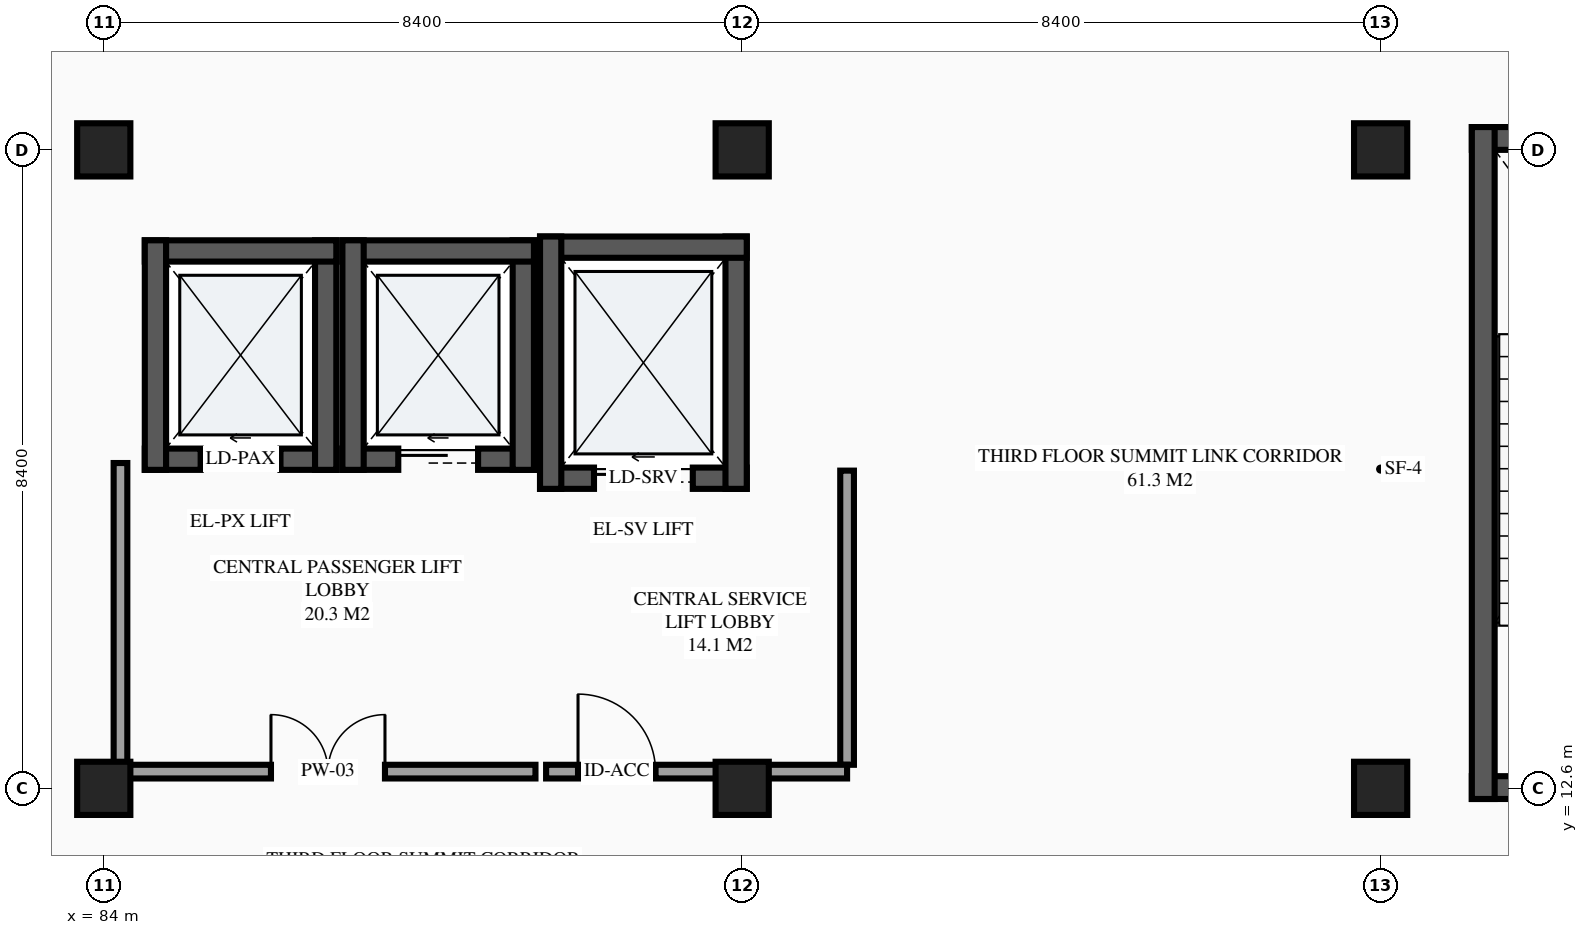
"""IFC4 building model, lengths in metres.
Left out: names, types, materials, properties, quantities, classifications, styles, units other than length and angle.
Written with IfcOpenShell. Run it as: python <this file> out.ifc"""

import sys

from ifc_helpers import new_model, si_unit, direction, frame, frame_2d, origin, origin_2d, place, context, subcontext, project, spatial, rectangle, extrude, element, fill, save


model = new_model("IFC4")
c1 = context("Model", 3, precision=1e-05, world=origin(), true_north=direction((0.0, 1.0)))
c2 = subcontext(c1, "Body", "Model", "MODEL_VIEW")
j1 = project(units=[si_unit("LENGTHUNIT", "METRE"), si_unit("PLANEANGLEUNIT", "RADIAN")], contexts=[c1])
p1 = place(None, origin())
s1 = spatial("IfcSite", under=j1, at=p1, CompositionType="ELEMENT")
p2 = place(p1, origin())
s2 = spatial("IfcBuilding", under=s1, at=p2, CompositionType="ELEMENT")
p3 = place(p2, frame((0.0, 0.0, 14.1)))
s3 = spatial("IfcBuildingStorey", under=s2, at=p3, CompositionType="ELEMENT", Elevation=14.1)
for number, where, z_axis, x_axis in (
    (1, (84.0, 12.6, 0.0), (0.0, 0.0, 1.0), (1.0, 0.0, 0.0)),
    (2, (84.0, 21.0, 0.0), (0.0, 0.0, 1.0), (1.0, 0.0, 0.0)),
    (3, (92.4, 12.6, 0.0), (0.0, 0.0, 1.0), (1.0, 0.0, 0.0)),
    (4, (92.4, 21.0, 0.0), (0.0, 0.0, 1.0), (1.0, 0.0, 0.0)),
    (5, (100.8, 12.6, 0.0), (0.0, 0.0, 1.0), (1.0, 0.0, 0.0)),
    (6, (100.8, 21.0, 0.0), (0.0, 0.0, 1.0), (1.0, 0.0, 0.0)),
):
    element("IfcColumn", number, at=place(p3, frame(where, z_axis=z_axis, x_axis=x_axis)), inside=s3, PredefinedType="COLUMN", context=c2, shape_type="SweptSolid", body=[
        extrude(rectangle(XDim=0.7, YDim=0.7, at=origin_2d()), origin(), (0.0, 0.0, 1.0), 4.2),
    ])
p4 = place(p3, frame((84.54, 16.93, 0.0), z_axis=(0.0, 0.0, 1.0), x_axis=(1.0, 0.0, 0.0)))
e7 = element("IfcWall", 7, at=p4, inside=s3, PredefinedType="SHEAR", context=c2, shape_type="SweptSolid", body=[
    extrude(rectangle(XDim=2.52, YDim=0.28, at=frame_2d((1.26, 0.0))), origin(), (0.0, 0.0, 1.0), 4.2),
])
p5 = place(p4, frame((0.735, 0.0, 0.0)))
e8 = element("IfcOpeningElement", 8, at=p5, cuts=e7, PredefinedType="OPENING", context=c2, shape_type="SweptSolid", body=[
    extrude(rectangle(XDim=1.05, YDim=2.2, at=frame_2d((0.525, 1.1))), frame((0.0, 0.15, 0.0), z_axis=(0.0, -1.0, 0.0), x_axis=(1.0, 0.0, 0.0)), (0.0, 0.0, 1.0), 0.3),
])
p6 = place(p3, frame((86.92, 16.79, 0.0), z_axis=(0.0, 0.0, 1.0), x_axis=(0.0, 1.0, 0.0)))
e9 = element("IfcWall", 9, at=p6, inside=s3, PredefinedType="SHEAR", context=c2, shape_type="SweptSolid", body=[
    extrude(rectangle(XDim=3.02, YDim=0.28, at=frame_2d((1.51, 0.0))), origin(), (0.0, 0.0, 1.0), 4.2),
])
p7 = place(p3, frame((87.06, 19.67, 0.0), z_axis=(0.0, 0.0, 1.0), x_axis=(-1.0, 0.0, 0.0)))
e10 = element("IfcWall", 10, at=p7, inside=s3, PredefinedType="SHEAR", context=c2, shape_type="SweptSolid", body=[
    extrude(rectangle(XDim=2.52, YDim=0.28, at=frame_2d((1.26, 0.0))), origin(), (0.0, 0.0, 1.0), 4.2),
])
p8 = place(p3, frame((84.68, 19.81, 0.0), z_axis=(0.0, 0.0, 1.0), x_axis=(0.0, -1.0, 0.0)))
e11 = element("IfcWall", 11, at=p8, inside=s3, PredefinedType="SHEAR", context=c2, shape_type="SweptSolid", body=[
    extrude(rectangle(XDim=3.02, YDim=0.28, at=frame_2d((1.51, 0.0))), origin(), (0.0, 0.0, 1.0), 4.2),
])
p9 = place(p3, frame((87.14, 16.93, 0.0), z_axis=(0.0, 0.0, 1.0), x_axis=(1.0, 0.0, 0.0)))
e12 = element("IfcWall", 12, at=p9, inside=s3, PredefinedType="SHEAR", context=c2, shape_type="SweptSolid", body=[
    extrude(rectangle(XDim=2.52, YDim=0.28, at=frame_2d((1.26, 0.0))), origin(), (0.0, 0.0, 1.0), 4.2),
])
p10 = place(p9, frame((0.735, 0.0, 0.0)))
e13 = element("IfcOpeningElement", 13, at=p10, cuts=e12, PredefinedType="OPENING", context=c2, shape_type="SweptSolid", body=[
    extrude(rectangle(XDim=1.05, YDim=2.2, at=frame_2d((0.525, 1.1))), frame((0.0, 0.15, 0.0), z_axis=(0.0, -1.0, 0.0), x_axis=(1.0, 0.0, 0.0)), (0.0, 0.0, 1.0), 0.3),
])
p11 = place(p3, frame((89.52, 16.79, 0.0), z_axis=(0.0, 0.0, 1.0), x_axis=(0.0, 1.0, 0.0)))
e14 = element("IfcWall", 14, at=p11, inside=s3, PredefinedType="SHEAR", context=c2, shape_type="SweptSolid", body=[
    extrude(rectangle(XDim=3.02, YDim=0.28, at=frame_2d((1.51, 0.0))), origin(), (0.0, 0.0, 1.0), 4.2),
])
p12 = place(p3, frame((89.66, 19.67, 0.0), z_axis=(0.0, 0.0, 1.0), x_axis=(-1.0, 0.0, 0.0)))
e15 = element("IfcWall", 15, at=p12, inside=s3, PredefinedType="SHEAR", context=c2, shape_type="SweptSolid", body=[
    extrude(rectangle(XDim=2.52, YDim=0.28, at=frame_2d((1.26, 0.0))), origin(), (0.0, 0.0, 1.0), 4.2),
])
p13 = place(p3, frame((87.28, 19.81, 0.0), z_axis=(0.0, 0.0, 1.0), x_axis=(0.0, -1.0, 0.0)))
e16 = element("IfcWall", 16, at=p13, inside=s3, PredefinedType="SHEAR", context=c2, shape_type="SweptSolid", body=[
    extrude(rectangle(XDim=3.02, YDim=0.28, at=frame_2d((1.51, 0.0))), origin(), (0.0, 0.0, 1.0), 4.2),
])
p14 = place(p3, frame((89.74, 16.68, 0.0), z_axis=(0.0, 0.0, 1.0), x_axis=(1.0, 0.0, 0.0)))
e17 = element("IfcWall", 17, at=p14, inside=s3, PredefinedType="SHEAR", context=c2, shape_type="SweptSolid", body=[
    extrude(rectangle(XDim=2.72, YDim=0.28, at=frame_2d((1.36, 0.0))), origin(), (0.0, 0.0, 1.0), 4.2),
])
p15 = place(p14, frame((0.71, 0.0, 0.0)))
e18 = element("IfcOpeningElement", 18, at=p15, cuts=e17, PredefinedType="OPENING", context=c2, shape_type="SweptSolid", body=[
    extrude(rectangle(XDim=1.3, YDim=2.25, at=frame_2d((0.65, 1.125))), frame((0.0, 0.15, 0.0), z_axis=(0.0, -1.0, 0.0), x_axis=(1.0, 0.0, 0.0)), (0.0, 0.0, 1.0), 0.3),
])
p16 = place(p3, frame((92.32, 16.54, 0.0), z_axis=(0.0, 0.0, 1.0), x_axis=(0.0, 1.0, 0.0)))
e19 = element("IfcWall", 19, at=p16, inside=s3, PredefinedType="SHEAR", context=c2, shape_type="SweptSolid", body=[
    extrude(rectangle(XDim=3.32, YDim=0.28, at=frame_2d((1.66, 0.0))), origin(), (0.0, 0.0, 1.0), 4.2),
])
p17 = place(p3, frame((92.46, 19.72, 0.0), z_axis=(0.0, 0.0, 1.0), x_axis=(-1.0, 0.0, 0.0)))
e20 = element("IfcWall", 20, at=p17, inside=s3, PredefinedType="SHEAR", context=c2, shape_type="SweptSolid", body=[
    extrude(rectangle(XDim=2.72, YDim=0.28, at=frame_2d((1.36, 0.0))), origin(), (0.0, 0.0, 1.0), 4.2),
])
p18 = place(p3, frame((89.88, 19.86, 0.0), z_axis=(0.0, 0.0, 1.0), x_axis=(0.0, -1.0, 0.0)))
e21 = element("IfcWall", 21, at=p18, inside=s3, PredefinedType="SHEAR", context=c2, shape_type="SweptSolid", body=[
    extrude(rectangle(XDim=3.32, YDim=0.28, at=frame_2d((1.66, 0.0))), origin(), (0.0, 0.0, 1.0), 4.2),
])
p19 = place(p3, frame((102.0, 12.61, 0.0), z_axis=(0.0, 0.0, 1.0), x_axis=(1.0, 0.0, 0.0)))
e22 = element("IfcWall", 22, at=p19, inside=s3, PredefinedType="SHEAR", context=c2, shape_type="SweptSolid", body=[
    extrude(rectangle(XDim=5.2, YDim=0.3, at=frame_2d((2.6, 0.0))), origin(), (0.0, 0.0, 1.0), 4.2),
])
p20 = place(p19, frame((2.025, 0.0, 0.0)))
e23 = element("IfcOpeningElement", 23, at=p20, cuts=e22, PredefinedType="OPENING", context=c2, shape_type="SweptSolid", body=[
    extrude(rectangle(XDim=1.15, YDim=2.15, at=frame_2d((0.575, 1.075))), frame((0.0, 0.16, 0.0), z_axis=(0.0, -1.0, 0.0), x_axis=(1.0, 0.0, 0.0)), (0.0, 0.0, 1.0), 0.32),
])
p21 = place(p3, frame((107.2, 21.15, 0.0), z_axis=(0.0, 0.0, 1.0), x_axis=(-1.0, 0.0, 0.0)))
e24 = element("IfcWall", 24, at=p21, inside=s3, PredefinedType="SHEAR", context=c2, shape_type="SweptSolid", body=[
    extrude(rectangle(XDim=5.2, YDim=0.3, at=frame_2d((2.6, 0.0))), origin(), (0.0, 0.0, 1.0), 4.2),
])
p22 = place(p3, frame((102.15, 21.3, 0.0), z_axis=(0.0, 0.0, 1.0), x_axis=(0.0, -1.0, 0.0)))
e25 = element("IfcWall", 25, at=p22, inside=s3, PredefinedType="SHEAR", context=c2, shape_type="SweptSolid", body=[
    extrude(rectangle(XDim=8.84, YDim=0.3, at=frame_2d((4.42, 0.0))), origin(), (0.0, 0.0, 1.0), 4.2),
])
p23 = place(p3, frame((84.22, 12.82, 0.0), z_axis=(0.0, 0.0, 1.0), x_axis=(1.0, 0.0, 0.0)))
e26 = element("IfcWall", 26, at=p23, inside=s3, PredefinedType="PARTITIONING", context=c2, shape_type="SweptSolid", body=[
    extrude(rectangle(XDim=5.46, YDim=0.18, at=frame_2d((2.73, 0.0))), origin(), (0.0, 0.0, 1.0), 3.0),
])
p24 = place(p23, frame((1.98, 0.0, 0.0)))
e27 = element("IfcOpeningElement", 27, at=p24, cuts=e26, PredefinedType="OPENING", context=c2, shape_type="SweptSolid", body=[
    extrude(rectangle(XDim=1.5, YDim=2.15, at=frame_2d((0.75, 1.075))), frame((0.0, 0.1, 0.0), z_axis=(0.0, -1.0, 0.0), x_axis=(1.0, 0.0, 0.0)), (0.0, 0.0, 1.0), 0.2),
])
p25 = place(p3, frame((84.22, 12.91, 0.0), z_axis=(0.0, 0.0, 1.0), x_axis=(0.0, 1.0, 0.0)))
e28 = element("IfcWall", 28, at=p25, inside=s3, PredefinedType="PARTITIONING", context=c2, shape_type="SweptSolid", body=[
    extrude(rectangle(XDim=3.97, YDim=0.18, at=frame_2d((1.985, 0.0))), origin(), (0.0, 0.0, 1.0), 2.95),
])
p26 = place(p3, frame((89.82, 12.82, 0.0), z_axis=(0.0, 0.0, 1.0), x_axis=(1.0, 0.0, 0.0)))
e29 = element("IfcWall", 29, at=p26, inside=s3, PredefinedType="PARTITIONING", context=c2, shape_type="SweptSolid", body=[
    extrude(rectangle(XDim=2.58, YDim=0.18, at=frame_2d((1.29, 0.0))), origin(), (0.0, 0.0, 1.0), 3.0),
])
p27 = place(p26, frame((0.42, 0.0, 0.0)))
e30 = element("IfcOpeningElement", 30, at=p27, cuts=e29, PredefinedType="OPENING", context=c2, shape_type="SweptSolid", body=[
    extrude(rectangle(XDim=1.02, YDim=2.15, at=frame_2d((0.51, 1.075))), frame((0.0, 0.1, 0.0), z_axis=(0.0, -1.0, 0.0), x_axis=(1.0, 0.0, 0.0)), (0.0, 0.0, 1.0), 0.2),
])
p28 = place(p3, frame((93.78, 12.91, 0.0), z_axis=(0.0, 0.0, 1.0), x_axis=(0.0, 1.0, 0.0)))
e31 = element("IfcWall", 31, at=p28, inside=s3, PredefinedType="PARTITIONING", context=c2, shape_type="SweptSolid", body=[
    extrude(rectangle(XDim=3.87, YDim=0.18, at=frame_2d((1.935, 0.0))), origin(), (0.0, 0.0, 1.0), 3.895),
])
p29 = place(p3, frame((92.4, 12.82, 0.0), z_axis=(0.0, 0.0, 1.0), x_axis=(1.0, 0.0, 0.0)))
e32 = element("IfcWall", 32, at=p29, inside=s3, PredefinedType="PARTITIONING", context=c2, shape_type="SweptSolid", body=[
    extrude(rectangle(XDim=1.38, YDim=0.18, at=frame_2d((0.69, 0.0))), origin(), (0.0, 0.0, 1.0), 3.1),
])
p30 = place(p5, origin())
e33 = element("IfcDoor", 33, at=p30, inside=s3, OperationType="SLIDING_TO_LEFT", PredefinedType="DOOR", context=c2, shape_type="SweptSolid", body=[
    extrude(rectangle(XDim=1.05, YDim=2.2, at=frame_2d((0.525, 1.1))), frame((0.0, 0.025, 0.0), z_axis=(0.0, -1.0, 0.0), x_axis=(1.0, 0.0, 0.0)), (0.0, 0.0, 1.0), 0.05),
])
fill(e8, e33)
p31 = place(p10, origin())
e34 = element("IfcDoor", 34, at=p31, inside=s3, OperationType="SLIDING_TO_LEFT", PredefinedType="DOOR", context=c2, shape_type="SweptSolid", body=[
    extrude(rectangle(XDim=1.05, YDim=2.2, at=frame_2d((0.525, 1.1))), frame((0.0, 0.025, 0.0), z_axis=(0.0, -1.0, 0.0), x_axis=(1.0, 0.0, 0.0)), (0.0, 0.0, 1.0), 0.05),
])
fill(e13, e34)
p32 = place(p15, origin())
e35 = element("IfcDoor", 35, at=p32, inside=s3, OperationType="SLIDING_TO_LEFT", PredefinedType="DOOR", context=c2, shape_type="SweptSolid", body=[
    extrude(rectangle(XDim=1.3, YDim=2.25, at=frame_2d((0.65, 1.125))), frame((0.0, 0.025, 0.0), z_axis=(0.0, -1.0, 0.0), x_axis=(1.0, 0.0, 0.0)), (0.0, 0.0, 1.0), 0.05),
])
fill(e18, e35)
p33 = place(p24, origin())
e36 = element("IfcDoor", 36, at=p33, inside=s3, OperationType="DOUBLE_DOOR_SINGLE_SWING", PredefinedType="DOOR", context=c2, shape_type="SweptSolid", body=[
    extrude(rectangle(XDim=1.5, YDim=2.15, at=frame_2d((0.75, 1.075))), frame((0.0, 0.025, 0.0), z_axis=(0.0, -1.0, 0.0), x_axis=(1.0, 0.0, 0.0)), (0.0, 0.0, 1.0), 0.05),
])
fill(e27, e36)
p34 = place(p27, origin())
e37 = element("IfcDoor", 37, at=p34, inside=s3, OperationType="SINGLE_SWING_LEFT", PredefinedType="DOOR", context=c2, shape_type="SweptSolid", body=[
    extrude(rectangle(XDim=1.02, YDim=2.15, at=frame_2d((0.51, 1.075))), frame((0.0, 0.025, 0.0), z_axis=(0.0, -1.0, 0.0), x_axis=(1.0, 0.0, 0.0)), (0.0, 0.0, 1.0), 0.05),
])
fill(e30, e37)
save(model, sys.argv[1])
